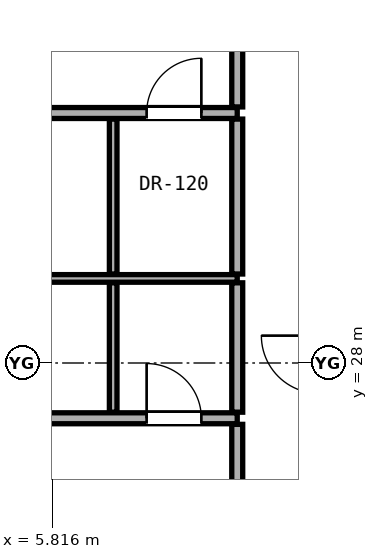
"""IFC4 building model, lengths in metres.
Left out: names, types, materials, properties, quantities, classifications, styles, units other than length and angle.
Written with IfcOpenShell. Run it as: python <this file> out.ifc"""

import sys

from ifc_helpers import new_model, si_unit, direction, frame, frame_2d, origin, place, context, subcontext, project, spatial, rectangle, extrude, element, fill, save


model = new_model("IFC4")
c1 = context("Model", 3, precision=1e-05, world=origin(), true_north=direction((0.0, 1.0)))
c2 = subcontext(c1, "Body", "Model", "MODEL_VIEW")
j1 = project(units=[si_unit("LENGTHUNIT", "METRE"), si_unit("PLANEANGLEUNIT", "RADIAN")], contexts=[c1])
p1 = place(None, origin())
s1 = spatial("IfcSite", under=j1, at=p1, CompositionType="ELEMENT")
p2 = place(p1, origin())
s2 = spatial("IfcBuilding", under=s1, at=p2, CompositionType="ELEMENT")
p3 = place(p2, frame((0.0, 0.0, 75.2)))
s3 = spatial("IfcBuildingStorey", under=s2, at=p3, CompositionType="ELEMENT", Elevation=75.2)
p4 = place(p3, frame((-2.04, 27.091, 0.0), z_axis=(0.0, 0.0, 1.0), x_axis=(1.0, 0.0, 0.0)))
e1 = element("IfcWall", 1, at=p4, inside=s3, PredefinedType="PARTITIONING", context=c2, shape_type="SweptSolid", body=[
    extrude(rectangle(XDim=10.9, YDim=0.18, at=frame_2d((5.45, 0.0))), origin(), (0.0, 0.0, 1.0), 2.125),
])
p5 = place(p4, frame((4.025, 0.0, 0.0)))
e2 = element("IfcOpeningElement", 2, at=p5, cuts=e1, PredefinedType="OPENING", context=c2, shape_type="SweptSolid", body=[
    extrude(rectangle(XDim=0.85, YDim=2.01, at=frame_2d((0.425, 1.005))), frame((0.0, 0.1, 0.0), z_axis=(0.0, -1.0, 0.0), x_axis=(1.0, 0.0, 0.0)), (0.0, 0.0, 1.0), 0.2),
])
p6 = place(p4, frame((9.41, 0.0, 0.0)))
e3 = element("IfcOpeningElement", 3, at=p6, cuts=e1, PredefinedType="OPENING", context=c2, shape_type="SweptSolid", body=[
    extrude(rectangle(XDim=0.9, YDim=2.1, at=frame_2d((0.45, 1.05))), frame((0.0, 0.1, 0.0), z_axis=(0.0, -1.0, 0.0), x_axis=(1.0, 0.0, 0.0)), (0.0, 0.0, 1.0), 0.2),
])
p7 = place(p3, frame((-2.04, 29.391, 0.0), z_axis=(0.0, 0.0, 1.0), x_axis=(1.0, 0.0, 0.0)))
e4 = element("IfcWall", 4, at=p7, inside=s3, PredefinedType="PARTITIONING", context=c2, shape_type="SweptSolid", body=[
    extrude(rectangle(XDim=10.9, YDim=0.125, at=frame_2d((5.45, 0.0))), origin(), (0.0, 0.0, 1.0), 2.125),
])
p8 = place(p3, frame((-2.04, 32.111, 0.0), z_axis=(0.0, 0.0, 1.0), x_axis=(1.0, 0.0, 0.0)))
e5 = element("IfcWall", 5, at=p8, inside=s3, PredefinedType="PARTITIONING", context=c2, shape_type="SweptSolid", body=[
    extrude(rectangle(XDim=10.9, YDim=0.18, at=frame_2d((5.45, 0.0))), origin(), (0.0, 0.0, 1.0), 2.125),
])
p9 = place(p8, frame((4.975, 0.0, 0.0)))
e6 = element("IfcOpeningElement", 6, at=p9, cuts=e5, PredefinedType="OPENING", context=c2, shape_type="SweptSolid", body=[
    extrude(rectangle(XDim=0.85, YDim=2.01, at=frame_2d((0.425, 1.005))), frame((0.0, 0.1, 0.0), z_axis=(0.0, -1.0, 0.0), x_axis=(1.0, 0.0, 0.0)), (0.0, 0.0, 1.0), 0.2),
])
p10 = place(p8, frame((9.41, 0.0, 0.0)))
e7 = element("IfcOpeningElement", 7, at=p10, cuts=e5, PredefinedType="OPENING", context=c2, shape_type="SweptSolid", body=[
    extrude(rectangle(XDim=0.9, YDim=2.1, at=frame_2d((0.45, 1.05))), frame((0.0, 0.1, 0.0), z_axis=(0.0, -1.0, 0.0), x_axis=(1.0, 0.0, 0.0)), (0.0, 0.0, 1.0), 0.2),
])
p11 = place(p3, frame((6.82, 27.191, 0.0), z_axis=(0.0, 0.0, 1.0), x_axis=(0.0, 1.0, 0.0)))
e8 = element("IfcWall", 8, at=p11, inside=s3, PredefinedType="PARTITIONING", context=c2, shape_type="SweptSolid", body=[
    extrude(rectangle(XDim=2.128, YDim=0.125, at=frame_2d((1.064, 0.0))), origin(), (0.0, 0.0, 1.0), 3.06),
])
p12 = place(p3, frame((6.82, 29.463, 0.0), z_axis=(0.0, 0.0, 1.0), x_axis=(0.0, 1.0, 0.0)))
e9 = element("IfcWall", 9, at=p12, inside=s3, PredefinedType="PARTITIONING", context=c2, shape_type="SweptSolid", body=[
    extrude(rectangle(XDim=2.548, YDim=0.125, at=frame_2d((1.274, 0.0))), origin(), (0.0, 0.0, 1.0), 2.279),
])
p13 = place(p3, frame((8.86, 14.014, 0.0), z_axis=(0.0, 0.0, 1.0), x_axis=(0.0, 1.0, 0.0)))
e10 = element("IfcWall", 10, at=p13, inside=s3, PredefinedType="PARTITIONING", context=c2, shape_type="SweptSolid", body=[
    extrude(rectangle(XDim=12.977, YDim=0.18, at=frame_2d((6.489, 0.0))), origin(), (0.0, 0.0, 1.0), 2.279),
])
p14 = place(p13, frame((5.963, 0.0, 0.0)))
e11 = element("IfcOpeningElement", 11, at=p14, cuts=e10, PredefinedType="OPENING", context=c2, shape_type="SweptSolid", body=[
    extrude(rectangle(XDim=1.05, YDim=2.2, at=frame_2d((0.525, 1.1))), frame((0.0, 0.1, 0.0), z_axis=(0.0, -1.0, 0.0), x_axis=(1.0, 0.0, 0.0)), (0.0, 0.0, 1.0), 0.2),
])
p15 = place(p3, frame((8.86, 27.191, 0.0), z_axis=(0.0, 0.0, 1.0), x_axis=(0.0, 1.0, 0.0)))
e12 = element("IfcWall", 12, at=p15, inside=s3, PredefinedType="PARTITIONING", context=c2, shape_type="SweptSolid", body=[
    extrude(rectangle(XDim=2.128, YDim=0.18, at=frame_2d((1.064, 0.0))), origin(), (0.0, 0.0, 1.0), 3.06),
])
p16 = place(p3, frame((8.86, 29.463, 0.0), z_axis=(0.0, 0.0, 1.0), x_axis=(0.0, 1.0, 0.0)))
e13 = element("IfcWall", 13, at=p16, inside=s3, PredefinedType="PARTITIONING", context=c2, shape_type="SweptSolid", body=[
    extrude(rectangle(XDim=2.548, YDim=0.18, at=frame_2d((1.274, 0.0))), origin(), (0.0, 0.0, 1.0), 2.279),
])
p17 = place(p3, frame((8.86, 32.211, 0.0), z_axis=(0.0, 0.0, 1.0), x_axis=(0.0, 1.0, 0.0)))
e14 = element("IfcWall", 14, at=p17, inside=s3, PredefinedType="PARTITIONING", context=c2, shape_type="SweptSolid", body=[
    extrude(rectangle(XDim=9.775, YDim=0.18, at=frame_2d((4.888, 0.0))), origin(), (0.0, 0.0, 1.0), 2.436),
])
p18 = place(p17, frame((4.363, 0.0, 0.0)))
e15 = element("IfcOpeningElement", 15, at=p18, cuts=e14, PredefinedType="OPENING", context=c2, shape_type="SweptSolid", body=[
    extrude(rectangle(XDim=1.05, YDim=2.2, at=frame_2d((0.525, 1.1))), frame((0.0, 0.1, 0.0), z_axis=(0.0, -1.0, 0.0), x_axis=(1.0, 0.0, 0.0)), (0.0, 0.0, 1.0), 0.2),
])
p19 = place(p6, origin())
e16 = element("IfcDoor", 16, at=p19, inside=s3, OperationType="SINGLE_SWING_LEFT", PredefinedType="DOOR", context=c2, shape_type="SweptSolid", body=[
    extrude(rectangle(XDim=0.9, YDim=2.1, at=frame_2d((0.45, 1.05))), frame((0.0, 0.025, 0.0), z_axis=(0.0, -1.0, 0.0), x_axis=(1.0, 0.0, 0.0)), (0.0, 0.0, 1.0), 0.05),
])
fill(e3, e16)
p20 = place(p10, origin())
e17 = element("IfcDoor", 17, at=p20, inside=s3, OperationType="SINGLE_SWING_RIGHT", PredefinedType="DOOR", context=c2, shape_type="SweptSolid", body=[
    extrude(rectangle(XDim=0.9, YDim=2.1, at=frame_2d((0.45, 1.05))), frame((0.0, 0.025, 0.0), z_axis=(0.0, -1.0, 0.0), x_axis=(1.0, 0.0, 0.0)), (0.0, 0.0, 1.0), 0.05),
])
fill(e7, e17)
save(model, sys.argv[1])
